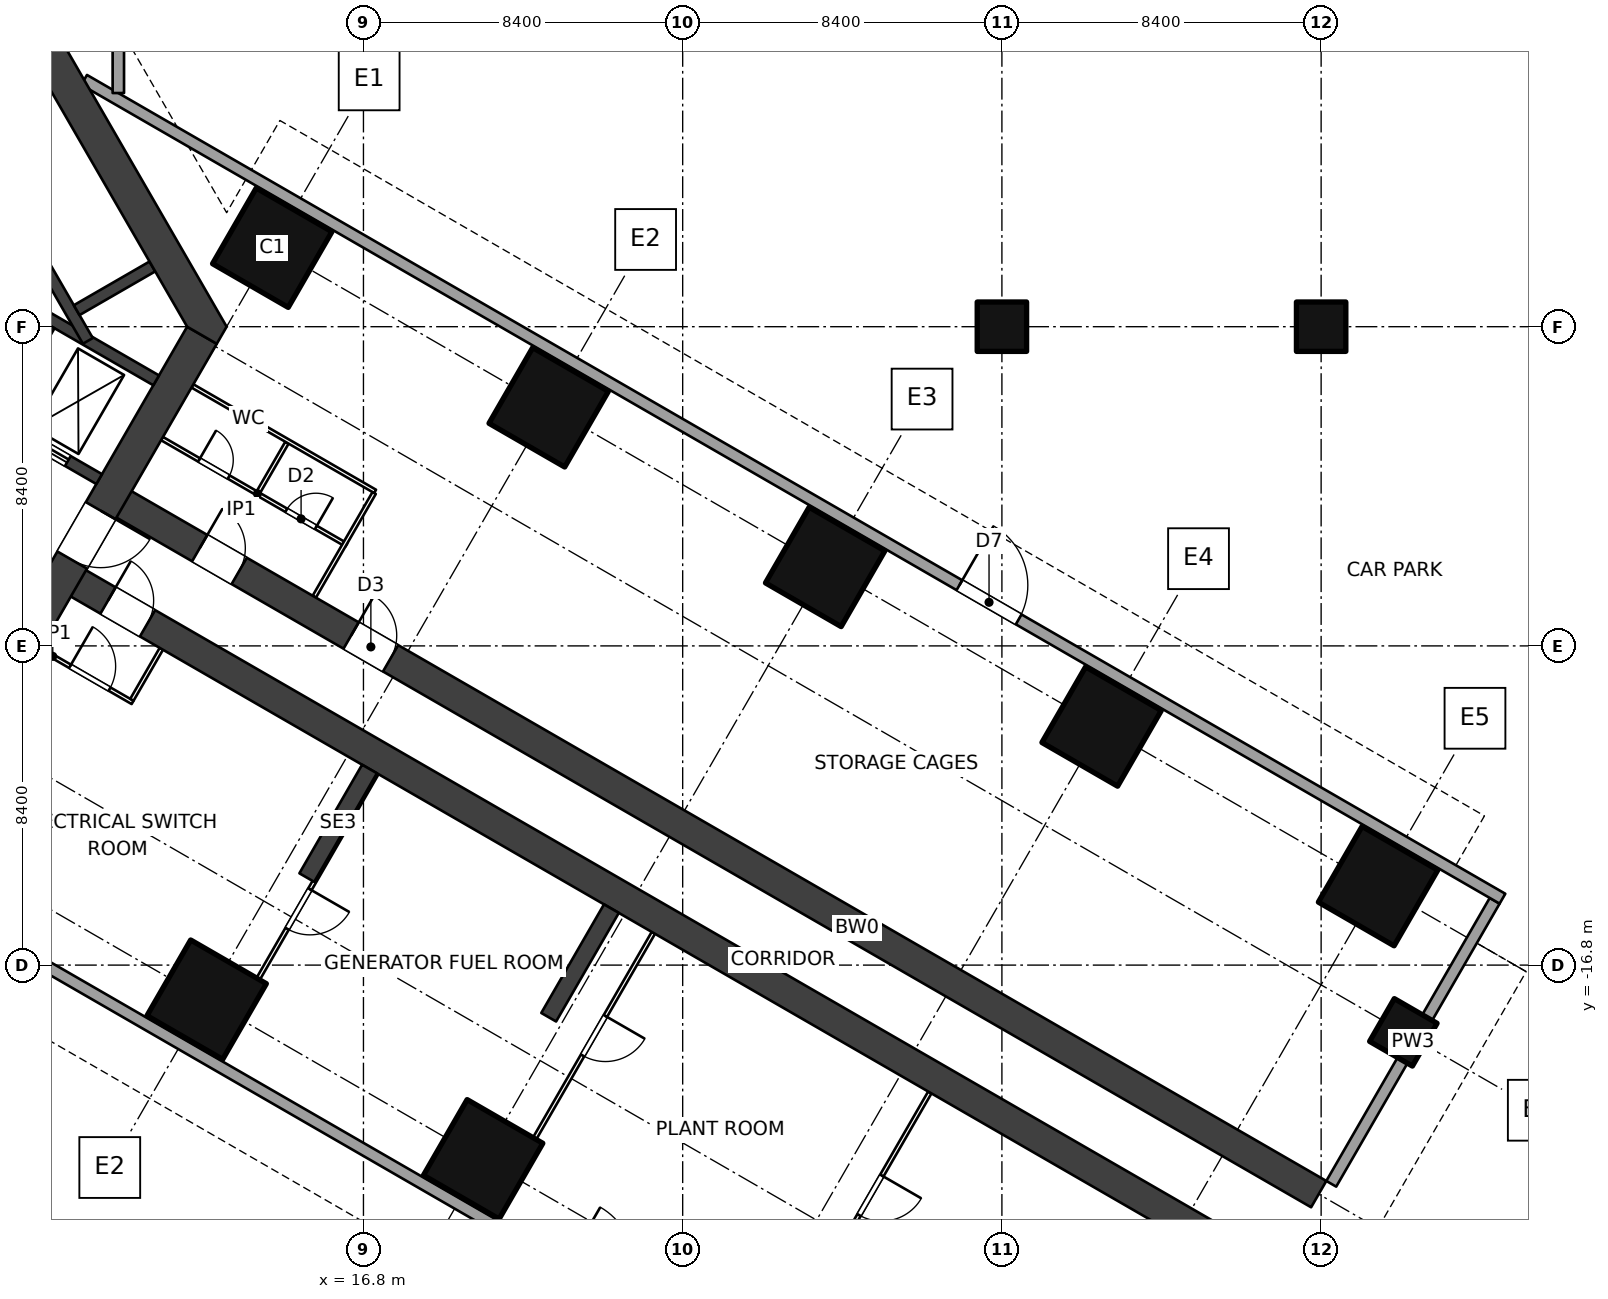
"""IFC4 building model, lengths in metres.
Left out: names, types, materials, properties, quantities, classifications, styles, units other than length and angle.
Written with IfcOpenShell. Run it as: python <this file> out.ifc"""

import sys

from ifc_helpers import new_model, si_unit, direction, frame, frame_2d, origin, origin_2d, place, context, subcontext, project, spatial, polyline, rectangle, outline, extrude, element, fill, save


model = new_model("IFC4")
c1 = context("Model", 3, precision=1e-05, world=origin(), true_north=direction((0.0, 1.0)))
c2 = subcontext(c1, "Body", "Model", "MODEL_VIEW")
j1 = project(units=[si_unit("LENGTHUNIT", "METRE"), si_unit("PLANEANGLEUNIT", "RADIAN")], contexts=[c1])
p1 = place(None, origin())
s1 = spatial("IfcSite", under=j1, at=p1, CompositionType="ELEMENT")
p2 = place(p1, origin())
s2 = spatial("IfcBuilding", under=s1, at=p2, CompositionType="ELEMENT")
p3 = place(p2, frame((0.0, 0.0, -10.5)))
s3 = spatial("IfcBuildingStorey", under=s2, at=p3, CompositionType="ELEMENT", Elevation=-10.5)
for number, where, z_axis, x_axis in (
    (1, (14.4, 2.078, 0.0), (0.0, 0.0, 1.0), (-0.5, -0.866, 0.0)),
    (2, (21.675, -2.122, 0.0), (0.0, 0.0, 1.0), (-0.5, -0.866, 0.0)),
    (3, (12.675, -17.71, 0.0), (0.0, 0.0, 1.0), (-0.5, -0.866, 0.0)),
    (4, (28.949, -6.322, 0.0), (0.0, 0.0, 1.0), (-0.5, -0.866, 0.0)),
    (5, (19.949, -21.91, 0.0), (0.0, 0.0, 1.0), (-0.5, -0.866, 0.0)),
    (6, (36.224, -10.521, 0.0), (0.0, 0.0, 1.0), (-0.5, -0.866, 0.0)),
    (7, (43.499, -14.721, 0.0), (0.0, 0.0, 1.0), (-0.5, -0.866, 0.0)),
):
    element("IfcColumn", number, at=place(p3, frame(where, z_axis=z_axis, x_axis=x_axis)), inside=s3, PredefinedType="COLUMN", context=c2, shape_type="SweptSolid", body=[
        extrude(rectangle(XDim=2.3, YDim=2.3, at=origin_2d()), origin(), (0.0, 0.0, 1.0), 3.5),
    ])
for number, where, z_axis, x_axis in (
    (8, (44.164, -18.57, 0.0), (0.0, 0.0, 1.0), (-0.5, -0.866, 0.0)),
    (9, (33.6, 0.0, 0.0), (0.0, 0.0, 1.0), (1.0, 0.0, 0.0)),
    (10, (42.0, 0.0, 0.0), (0.0, 0.0, 1.0), (1.0, 0.0, 0.0)),
):
    element("IfcColumn", number, at=place(p3, frame(where, z_axis=z_axis, x_axis=x_axis)), inside=s3, PredefinedType="COLUMN", context=c2, shape_type="SweptSolid", body=[
        extrude(rectangle(XDim=1.3, YDim=1.3, at=origin_2d()), origin(), (0.0, 0.0, 1.0), 3.5),
    ])
p4 = place(p3, frame((12.551, -0.225, 0.0), z_axis=(0.0, 0.0, 1.0), x_axis=(-0.499997612506, -0.8660267822, 0.0)))
e11 = element("IfcWall", 11, at=p4, inside=s3, PredefinedType="SHEAR", context=c2, shape_type="SweptSolid", body=[
    extrude(rectangle(XDim=12.161, YDim=0.9, at=frame_2d((6.08, 0.0))), origin(), (0.0, 0.0, 1.0), 3.5),
])
p5 = place(p4, frame((5.33, 0.0, 0.0)))
e12 = element("IfcOpeningElement", 12, at=p5, cuts=e11, PredefinedType="OPENING", context=c2, shape_type="SweptSolid", body=[
    extrude(rectangle(XDim=1.5, YDim=2.1, at=frame_2d((0.75, 1.05))), frame((0.0, 0.46, 0.0), z_axis=(0.0, -1.0, 0.0), x_axis=(1.0, 0.0, 0.0)), (0.0, 0.0, 1.0), 0.92),
])
p6 = place(p3, origin())
e13 = element("IfcWall", 13, at=p6, inside=s3, PredefinedType="SHEAR", context=c2, shape_type="SweptSolid", body=[
    extrude(outline(polyline([(13.2, 0.0), (6.6, 11.432), (6.08, 11.432), (6.08, 10.531), (12.161, 0.0), (12.94, -0.45), (13.2, 0.0)])), origin(), (0.0, 0.0, 1.0), 3.5),
])
p7 = place(p3, frame((3.869, -0.559, 0.0), z_axis=(0.0, 0.0, 1.0), x_axis=(0.86602711848, -0.499997030048, 0.0)))
e14 = element("IfcWall", 14, at=p7, inside=s3, PredefinedType="SHEAR", context=c2, shape_type="SweptSolid", body=[
    extrude(rectangle(XDim=6.901, YDim=0.3, at=frame_2d((3.451, 0.0))), origin(), (0.0, 0.0, 1.0), 3.5),
])
p8 = place(p7, frame((4.85, 0.0, 0.0)))
e15 = element("IfcOpeningElement", 15, at=p8, cuts=e14, PredefinedType="OPENING", context=c2, shape_type="SweptSolid", body=[
    extrude(rectangle(XDim=1.1, YDim=2.1, at=frame_2d((0.55, 1.05))), frame((0.0, 0.16, 0.0), z_axis=(0.0, -1.0, 0.0), x_axis=(1.0, 0.0, 0.0)), (0.0, 0.0, 1.0), 0.32),
])
p9 = place(p3, frame((5.369, 2.039, 0.0), z_axis=(0.0, 0.0, 1.0), x_axis=(0.86602711848, -0.499997030048, 0.0)))
e16 = element("IfcWall", 16, at=p9, inside=s3, PredefinedType="SHEAR", context=c2, shape_type="SweptSolid", body=[
    extrude(rectangle(XDim=6.901, YDim=0.3, at=frame_2d((3.451, 0.0))), origin(), (0.0, 0.0, 1.0), 3.5),
])
p10 = place(p3, frame((8.541, 0.034, 0.0), z_axis=(0.0, 0.0, 1.0), x_axis=(-0.50000943426, -0.866019956843, 0.0)))
e17 = element("IfcWall", 17, at=p10, inside=s3, PredefinedType="SHEAR", context=c2, shape_type="SweptSolid", body=[
    extrude(rectangle(XDim=2.7, YDim=0.3, at=frame_2d((1.35, 0.0))), origin(), (0.0, 0.0, 1.0), 3.5),
])
p11 = place(p3, frame((4.45, 8.455, 0.0), z_axis=(0.0, 0.0, 1.0), x_axis=(0.500002290144, -0.866024081565, 0.0)))
e18 = element("IfcWall", 18, at=p11, inside=s3, PredefinedType="SHEAR", context=c2, shape_type="SweptSolid", body=[
    extrude(rectangle(XDim=10.195, YDim=0.3, at=frame_2d((5.098, 0.0))), origin(), (0.0, 0.0, 1.0), 3.5),
])
p12 = place(p11, frame((4.648, 0.0, 0.0)))
e19 = element("IfcOpeningElement", 19, at=p12, cuts=e18, PredefinedType="OPENING", context=c2, shape_type="SweptSolid", body=[
    extrude(rectangle(XDim=0.9, YDim=2.1, at=frame_2d((0.45, 1.05))), frame((0.0, 0.16, 0.0), z_axis=(0.0, -1.0, 0.0), x_axis=(1.0, 0.0, 0.0)), (0.0, 0.0, 1.0), 0.32),
])
p13 = place(p3, frame((9.254, 0.435, 0.0), z_axis=(0.0, 0.0, 1.0), x_axis=(0.866007057882, 0.500031774688, 0.0)))
e20 = element("IfcWall", 20, at=p13, inside=s3, PredefinedType="SHEAR", context=c2, shape_type="SweptSolid", body=[
    extrude(rectangle(XDim=2.3, YDim=0.3, at=frame_2d((1.15, 0.0))), origin(), (0.0, 0.0, 1.0), 3.5),
])
p14 = place(p3, frame((10.11, -4.451, 0.0), z_axis=(0.0, 0.0, 1.0), x_axis=(0.866025284237, -0.500000207062, 0.0)))
e21 = element("IfcWall", 21, at=p14, inside=s3, PredefinedType="SHEAR", context=c2, shape_type="SweptSolid", body=[
    extrude(rectangle(XDim=36.75, YDim=0.8, at=frame_2d((18.375, 0.0))), origin(), (0.0, 0.0, 1.0), 3.5),
])
p15 = place(p14, frame((2.75, 0.0, 0.0)))
e22 = element("IfcOpeningElement", 22, at=p15, cuts=e21, PredefinedType="OPENING", context=c2, shape_type="SweptSolid", body=[
    extrude(rectangle(XDim=1.2, YDim=2.1, at=frame_2d((0.6, 1.05))), frame((0.0, 0.41, 0.0), z_axis=(0.0, -1.0, 0.0), x_axis=(1.0, 0.0, 0.0)), (0.0, 0.0, 1.0), 0.82),
])
p16 = place(p14, frame((7.35, 0.0, 0.0)))
e23 = element("IfcOpeningElement", 23, at=p16, cuts=e21, PredefinedType="OPENING", context=c2, shape_type="SweptSolid", body=[
    extrude(rectangle(XDim=1.2, YDim=2.1, at=frame_2d((0.6, 1.05))), frame((0.0, 0.41, 0.0), z_axis=(0.0, -1.0, 0.0), x_axis=(1.0, 0.0, 0.0)), (0.0, 0.0, 1.0), 0.82),
])
p17 = place(p3, frame((8.91, -6.53, 0.0), z_axis=(0.0, 0.0, 1.0), x_axis=(0.866025284237, -0.500000207062, 0.0)))
e24 = element("IfcWall", 24, at=p17, inside=s3, PredefinedType="SHEAR", context=c2, shape_type="SweptSolid", body=[
    extrude(rectangle(XDim=36.75, YDim=0.8, at=frame_2d((18.375, 0.0))), origin(), (0.0, 0.0, 1.0), 3.5),
])
p18 = place(p17, frame((1.35, 0.0, 0.0)))
e25 = element("IfcOpeningElement", 25, at=p18, cuts=e24, PredefinedType="OPENING", context=c2, shape_type="SweptSolid", body=[
    extrude(rectangle(XDim=1.2, YDim=2.1, at=frame_2d((0.6, 1.05))), frame((0.0, 0.41, 0.0), z_axis=(0.0, -1.0, 0.0), x_axis=(1.0, 0.0, 0.0)), (0.0, 0.0, 1.0), 0.82),
])
p19 = place(p3, frame((11.5, -2.945, 0.0), z_axis=(0.0, 0.0, 1.0), x_axis=(0.866045472092, -0.499965239061, 0.0)))
e26 = element("IfcWall", 26, at=p19, inside=s3, PredefinedType="PARTITIONING", context=c2, shape_type="SweptSolid", body=[
    extrude(rectangle(XDim=5.6, YDim=0.1, at=frame_2d((2.8, 0.0))), origin(), (0.0, 0.0, 1.0), 3.2),
])
p20 = place(p19, frame((1.125, 0.0, 0.0)))
e27 = element("IfcOpeningElement", 27, at=p20, cuts=e26, PredefinedType="OPENING", context=c2, shape_type="SweptSolid", body=[
    extrude(rectangle(XDim=0.9, YDim=2.1, at=frame_2d((0.45, 1.05))), frame((0.0, 0.06, 0.0), z_axis=(0.0, -1.0, 0.0), x_axis=(1.0, 0.0, 0.0)), (0.0, 0.0, 1.0), 0.12),
])
p21 = place(p19, frame((3.775, 0.0, 0.0)))
e28 = element("IfcOpeningElement", 28, at=p21, cuts=e26, PredefinedType="OPENING", context=c2, shape_type="SweptSolid", body=[
    extrude(rectangle(XDim=0.9, YDim=2.1, at=frame_2d((0.45, 1.05))), frame((0.0, 0.06, 0.0), z_axis=(0.0, -1.0, 0.0), x_axis=(1.0, 0.0, 0.0)), (0.0, 0.0, 1.0), 0.12),
])
p22 = place(p3, frame((14.036, -4.351, 0.0), z_axis=(0.0, 0.0, 1.0), x_axis=(0.500060622324, 0.86599040064, 0.0)))
e29 = element("IfcWall", 29, at=p22, inside=s3, PredefinedType="PARTITIONING", context=c2, shape_type="SweptSolid", body=[
    extrude(rectangle(XDim=1.5, YDim=0.1, at=frame_2d((0.75, 0.0))), origin(), (0.0, 0.0, 1.0), 3.2),
])
p23 = place(p3, frame((12.3, -1.559, 0.0), z_axis=(0.0, 0.0, 1.0), x_axis=(0.866031018186, -0.499990275446, 0.0)))
e30 = element("IfcWall", 30, at=p23, inside=s3, PredefinedType="PARTITIONING", context=c2, shape_type="SweptSolid", body=[
    extrude(rectangle(XDim=5.55, YDim=0.1, at=frame_2d((2.775, 0.0))), origin(), (0.0, 0.0, 1.0), 3.2),
])
p24 = place(p3, frame((15.506, -7.105, 0.0), z_axis=(0.0, 0.0, 1.0), x_axis=(0.500039995618, 0.866002311072, 0.0)))
e31 = element("IfcWall", 31, at=p24, inside=s3, PredefinedType="PARTITIONING", context=c2, shape_type="SweptSolid", body=[
    extrude(rectangle(XDim=3.15, YDim=0.1, at=frame_2d((1.575, 0.0))), origin(), (0.0, 0.0, 1.0), 3.2),
])
p25 = place(p3, frame((8.3, -8.487, 0.0), z_axis=(0.0, 0.0, 1.0), x_axis=(0.866034573852, -0.49998411664, 0.0)))
e32 = element("IfcWall", 32, at=p25, inside=s3, PredefinedType="PARTITIONING", context=c2, shape_type="SweptSolid", body=[
    extrude(rectangle(XDim=2.8, YDim=0.1, at=frame_2d((1.4, 0.0))), origin(), (0.0, 0.0, 1.0), 3.2),
])
p26 = place(p25, frame((0.9, 0.0, 0.0)))
e33 = element("IfcOpeningElement", 33, at=p26, cuts=e32, PredefinedType="OPENING", context=c2, shape_type="SweptSolid", body=[
    extrude(rectangle(XDim=1.2, YDim=2.1, at=frame_2d((0.6, 1.05))), frame((0.0, 0.06, 0.0), z_axis=(0.0, -1.0, 0.0), x_axis=(1.0, 0.0, 0.0)), (0.0, 0.0, 1.0), 0.12),
])
p27 = place(p3, frame((11.482, -8.476, 0.0), z_axis=(0.0, 0.0, 1.0), x_axis=(-0.500017819788, -0.86601511528, 0.0)))
e34 = element("IfcWall", 34, at=p27, inside=s3, PredefinedType="PARTITIONING", context=c2, shape_type="SweptSolid", body=[
    extrude(rectangle(XDim=1.55, YDim=0.1, at=frame_2d((0.775, 0.0))), origin(), (0.0, 0.0, 1.0), 3.2),
])
p28 = place(p3, frame((17.154, -11.751, 0.0), z_axis=(0.0, 0.0, 1.0), x_axis=(-0.500007509209, -0.866021068297, 0.0)))
e35 = element("IfcWall", 35, at=p28, inside=s3, PredefinedType="PARTITIONING", context=c2, shape_type="SweptSolid", body=[
    extrude(rectangle(XDim=8.6, YDim=0.1, at=frame_2d((4.3, 0.0))), origin(), (0.0, 0.0, 1.0), 3.2),
])
p29 = place(p28, frame((3.525, 0.0, 0.0)))
e36 = element("IfcOpeningElement", 36, at=p29, cuts=e35, PredefinedType="OPENING", context=c2, shape_type="SweptSolid", body=[
    extrude(rectangle(XDim=1.2, YDim=2.1, at=frame_2d((0.6, 1.05))), frame((0.0, 0.06, 0.0), z_axis=(0.0, -1.0, 0.0), x_axis=(1.0, 0.0, 0.0)), (0.0, 0.0, 1.0), 0.12),
])
p30 = place(p3, frame((24.429, -15.951, 0.0), z_axis=(0.0, 0.0, 1.0), x_axis=(-0.500007509209, -0.866021068297, 0.0)))
e37 = element("IfcWall", 37, at=p30, inside=s3, PredefinedType="PARTITIONING", context=c2, shape_type="SweptSolid", body=[
    extrude(rectangle(XDim=8.6, YDim=0.1, at=frame_2d((4.3, 0.0))), origin(), (0.0, 0.0, 1.0), 3.2),
])
p31 = place(p30, frame((2.525, 0.0, 0.0)))
e38 = element("IfcOpeningElement", 38, at=p31, cuts=e37, PredefinedType="OPENING", context=c2, shape_type="SweptSolid", body=[
    extrude(rectangle(XDim=1.2, YDim=2.1, at=frame_2d((0.6, 1.05))), frame((0.0, 0.06, 0.0), z_axis=(0.0, -1.0, 0.0), x_axis=(1.0, 0.0, 0.0)), (0.0, 0.0, 1.0), 0.12),
])
p32 = place(p3, frame((31.703, -20.151, 0.0), z_axis=(0.0, 0.0, 1.0), x_axis=(-0.500007509209, -0.866021068297, 0.0)))
e39 = element("IfcWall", 39, at=p32, inside=s3, PredefinedType="PARTITIONING", context=c2, shape_type="SweptSolid", body=[
    extrude(rectangle(XDim=8.6, YDim=0.1, at=frame_2d((4.3, 0.0))), origin(), (0.0, 0.0, 1.0), 3.2),
])
p33 = place(p32, frame((2.525, 0.0, 0.0)))
e40 = element("IfcOpeningElement", 40, at=p33, cuts=e39, PredefinedType="OPENING", context=c2, shape_type="SweptSolid", body=[
    extrude(rectangle(XDim=1.2, YDim=2.1, at=frame_2d((0.6, 1.05))), frame((0.0, 0.06, 0.0), z_axis=(0.0, -1.0, 0.0), x_axis=(1.0, 0.0, 0.0)), (0.0, 0.0, 1.0), 0.12),
])
p34 = place(p3, frame((42.267, -22.555, 0.0), z_axis=(0.0, 0.0, 1.0), x_axis=(0.500007509209, 0.866021068297, 0.0)))
e41 = element("IfcWall", 41, at=p34, inside=s3, PredefinedType="SOLIDWALL", context=c2, shape_type="SweptSolid", body=[
    extrude(rectangle(XDim=8.6, YDim=0.3, at=frame_2d((4.3, 0.0))), origin(), (0.0, 0.0, 1.0), 1.9),
])
p35 = place(p3, frame((10.35, 6.149, 0.0), z_axis=(0.0, 0.0, 1.0), x_axis=(0.0, 1.0, 0.0)))
e42 = element("IfcWall", 42, at=p35, inside=s3, PredefinedType="SOLIDWALL", context=c2, shape_type="SweptSolid", body=[
    extrude(rectangle(XDim=41.883, YDim=0.3, at=frame_2d((20.941, 0.0))), origin(), (0.0, 0.0, 1.0), 3.2),
])
p36 = place(p35, frame((25.383, 0.0, 0.0)))
e43 = element("IfcOpeningElement", 43, at=p36, cuts=e42, PredefinedType="OPENING", context=c2, shape_type="SweptSolid", body=[
    extrude(rectangle(XDim=1.8, YDim=2.4, at=frame_2d((0.9, 1.2))), frame((0.0, 0.16, 0.0), z_axis=(0.0, -1.0, 0.0), x_axis=(1.0, 0.0, 0.0)), (0.0, 0.0, 1.0), 0.32),
])
p37 = place(p3, frame((9.45, 6.495, 0.0), z_axis=(0.0, 0.0, 1.0), x_axis=(0.866025301493, -0.500000177174, 0.0)))
e44 = element("IfcWall", 44, at=p37, inside=s3, PredefinedType="SOLIDWALL", context=c2, shape_type="SweptSolid", body=[
    extrude(rectangle(XDim=43.095, YDim=0.3, at=frame_2d((21.548, 0.0))), origin(), (0.0, 0.0, 1.0), 3.2),
])
p38 = place(p37, frame((26.595, 0.0, 0.0)))
e45 = element("IfcOpeningElement", 45, at=p38, cuts=e44, PredefinedType="OPENING", context=c2, shape_type="SweptSolid", body=[
    extrude(rectangle(XDim=1.8, YDim=2.4, at=frame_2d((0.9, 1.2))), frame((0.0, 0.16, 0.0), z_axis=(0.0, -1.0, 0.0), x_axis=(1.0, 0.0, 0.0)), (0.0, 0.0, 1.0), 0.32),
])
p39 = place(p3, frame((-0.9, -11.432, 0.0), z_axis=(0.0, 0.0, 1.0), x_axis=(0.866025301493, -0.500000177174, 0.0)))
e46 = element("IfcWall", 46, at=p39, inside=s3, PredefinedType="SOLIDWALL", context=c2, shape_type="SweptSolid", body=[
    extrude(rectangle(XDim=43.095, YDim=0.3, at=frame_2d((21.548, 0.0))), origin(), (0.0, 0.0, 1.0), 3.2),
])
p40 = place(p39, frame((26.595, 0.0, 0.0)))
e47 = element("IfcOpeningElement", 47, at=p40, cuts=e46, PredefinedType="OPENING", context=c2, shape_type="SweptSolid", body=[
    extrude(rectangle(XDim=1.8, YDim=2.4, at=frame_2d((0.9, 1.2))), frame((0.0, 0.16, 0.0), z_axis=(0.0, -1.0, 0.0), x_axis=(1.0, 0.0, 0.0)), (0.0, 0.0, 1.0), 0.32),
])
for number, where, z_axis, x_axis in (
    (48, (16.959, -11.639, 0.0), (0.0, 0.0, 1.0), (-0.5, -0.866, 0.0)),
    (49, (23.324, -15.314, 0.0), (0.0, 0.0, 1.0), (-0.5, -0.866, 0.0)),
):
    element("IfcWall", number, at=place(p3, frame(where, z_axis=z_axis, x_axis=x_axis)), inside=s3, PredefinedType="SOLIDWALL", context=c2, shape_type="SweptSolid", body=[
        extrude(rectangle(XDim=3.3, YDim=0.45, at=frame_2d((1.65, 0.0))), origin(), (0.0, 0.0, 1.0), 3.5),
    ])
p41 = place(p8, origin())
e50 = element("IfcDoor", 50, at=p41, inside=s3, OperationType="DOUBLE_DOOR_SLIDING", PredefinedType="DOOR", context=c2, shape_type="SweptSolid", body=[
    extrude(rectangle(XDim=1.1, YDim=2.1, at=frame_2d((0.55, 1.05))), frame((0.0, 0.025, 0.0), z_axis=(0.0, -1.0, 0.0), x_axis=(1.0, 0.0, 0.0)), (0.0, 0.0, 1.0), 0.05),
])
fill(e15, e50)
p42 = place(p5, origin())
e51 = element("IfcDoor", 51, at=p42, inside=s3, OperationType="DOUBLE_DOOR_DOUBLE_SWING", PredefinedType="DOOR", context=c2, shape_type="SweptSolid", body=[
    extrude(rectangle(XDim=1.5, YDim=2.1, at=frame_2d((0.75, 1.05))), frame((0.0, 0.025, 0.0), z_axis=(0.0, -1.0, 0.0), x_axis=(1.0, 0.0, 0.0)), (0.0, 0.0, 1.0), 0.05),
])
fill(e12, e51)
p43 = place(p20, origin())
e52 = element("IfcDoor", 52, at=p43, inside=s3, OperationType="SINGLE_SWING_LEFT", PredefinedType="DOOR", context=c2, shape_type="SweptSolid", body=[
    extrude(rectangle(XDim=0.9, YDim=2.1, at=frame_2d((0.45, 1.05))), frame((0.0, 0.025, 0.0), z_axis=(0.0, -1.0, 0.0), x_axis=(1.0, 0.0, 0.0)), (0.0, 0.0, 1.0), 0.05),
])
fill(e27, e52)
p44 = place(p21, origin())
e53 = element("IfcDoor", 53, at=p44, inside=s3, OperationType="SINGLE_SWING_RIGHT", PredefinedType="DOOR", context=c2, shape_type="SweptSolid", body=[
    extrude(rectangle(XDim=0.9, YDim=2.1, at=frame_2d((0.45, 1.05))), frame((0.0, 0.025, 0.0), z_axis=(0.0, -1.0, 0.0), x_axis=(1.0, 0.0, 0.0)), (0.0, 0.0, 1.0), 0.05),
])
fill(e28, e53)
p45 = place(p15, origin())
e54 = element("IfcDoor", 54, at=p45, inside=s3, OperationType="DOUBLE_SWING_LEFT", PredefinedType="DOOR", context=c2, shape_type="SweptSolid", body=[
    extrude(rectangle(XDim=1.2, YDim=2.1, at=frame_2d((0.6, 1.05))), frame((0.0, 0.025, 0.0), z_axis=(0.0, -1.0, 0.0), x_axis=(1.0, 0.0, 0.0)), (0.0, 0.0, 1.0), 0.05),
])
fill(e22, e54)
p46 = place(p16, origin())
e55 = element("IfcDoor", 55, at=p46, inside=s3, OperationType="DOUBLE_SWING_LEFT", PredefinedType="DOOR", context=c2, shape_type="SweptSolid", body=[
    extrude(rectangle(XDim=1.2, YDim=2.1, at=frame_2d((0.6, 1.05))), frame((0.0, 0.025, 0.0), z_axis=(0.0, -1.0, 0.0), x_axis=(1.0, 0.0, 0.0)), (0.0, 0.0, 1.0), 0.05),
])
fill(e23, e55)
p47 = place(p18, origin())
e56 = element("IfcDoor", 56, at=p47, inside=s3, OperationType="DOUBLE_SWING_LEFT", PredefinedType="DOOR", context=c2, shape_type="SweptSolid", body=[
    extrude(rectangle(XDim=1.2, YDim=2.1, at=frame_2d((0.6, 1.05))), frame((0.0, 0.025, 0.0), z_axis=(0.0, -1.0, 0.0), x_axis=(1.0, 0.0, 0.0)), (0.0, 0.0, 1.0), 0.05),
])
fill(e25, e56)
p48 = place(p29, origin())
e57 = element("IfcDoor", 57, at=p48, inside=s3, OperationType="DOUBLE_SWING_LEFT", PredefinedType="DOOR", context=c2, shape_type="SweptSolid", body=[
    extrude(rectangle(XDim=1.2, YDim=2.1, at=frame_2d((0.6, 1.05))), frame((0.0, 0.025, 0.0), z_axis=(0.0, -1.0, 0.0), x_axis=(1.0, 0.0, 0.0)), (0.0, 0.0, 1.0), 0.05),
])
fill(e36, e57)
p49 = place(p31, origin())
e58 = element("IfcDoor", 58, at=p49, inside=s3, OperationType="DOUBLE_SWING_LEFT", PredefinedType="DOOR", context=c2, shape_type="SweptSolid", body=[
    extrude(rectangle(XDim=1.2, YDim=2.1, at=frame_2d((0.6, 1.05))), frame((0.0, 0.025, 0.0), z_axis=(0.0, -1.0, 0.0), x_axis=(1.0, 0.0, 0.0)), (0.0, 0.0, 1.0), 0.05),
])
fill(e38, e58)
p50 = place(p33, origin())
e59 = element("IfcDoor", 59, at=p50, inside=s3, OperationType="DOUBLE_SWING_LEFT", PredefinedType="DOOR", context=c2, shape_type="SweptSolid", body=[
    extrude(rectangle(XDim=1.2, YDim=2.1, at=frame_2d((0.6, 1.05))), frame((0.0, 0.025, 0.0), z_axis=(0.0, -1.0, 0.0), x_axis=(1.0, 0.0, 0.0)), (0.0, 0.0, 1.0), 0.05),
])
fill(e40, e59)
p51 = place(p26, origin())
e60 = element("IfcDoor", 60, at=p51, inside=s3, OperationType="DOUBLE_SWING_LEFT", PredefinedType="DOOR", context=c2, shape_type="SweptSolid", body=[
    extrude(rectangle(XDim=1.2, YDim=2.1, at=frame_2d((0.6, 1.05))), frame((0.0, 0.025, 0.0), z_axis=(0.0, -1.0, 0.0), x_axis=(1.0, 0.0, 0.0)), (0.0, 0.0, 1.0), 0.05),
])
fill(e33, e60)
p52 = place(p38, origin())
e61 = element("IfcDoor", 61, at=p52, inside=s3, OperationType="DOUBLE_DOOR_DOUBLE_SWING", PredefinedType="DOOR", context=c2, shape_type="SweptSolid", body=[
    extrude(rectangle(XDim=1.8, YDim=2.4, at=frame_2d((0.9, 1.2))), frame((0.0, 0.025, 0.0), z_axis=(0.0, -1.0, 0.0), x_axis=(1.0, 0.0, 0.0)), (0.0, 0.0, 1.0), 0.05),
])
fill(e45, e61)
save(model, sys.argv[1])
